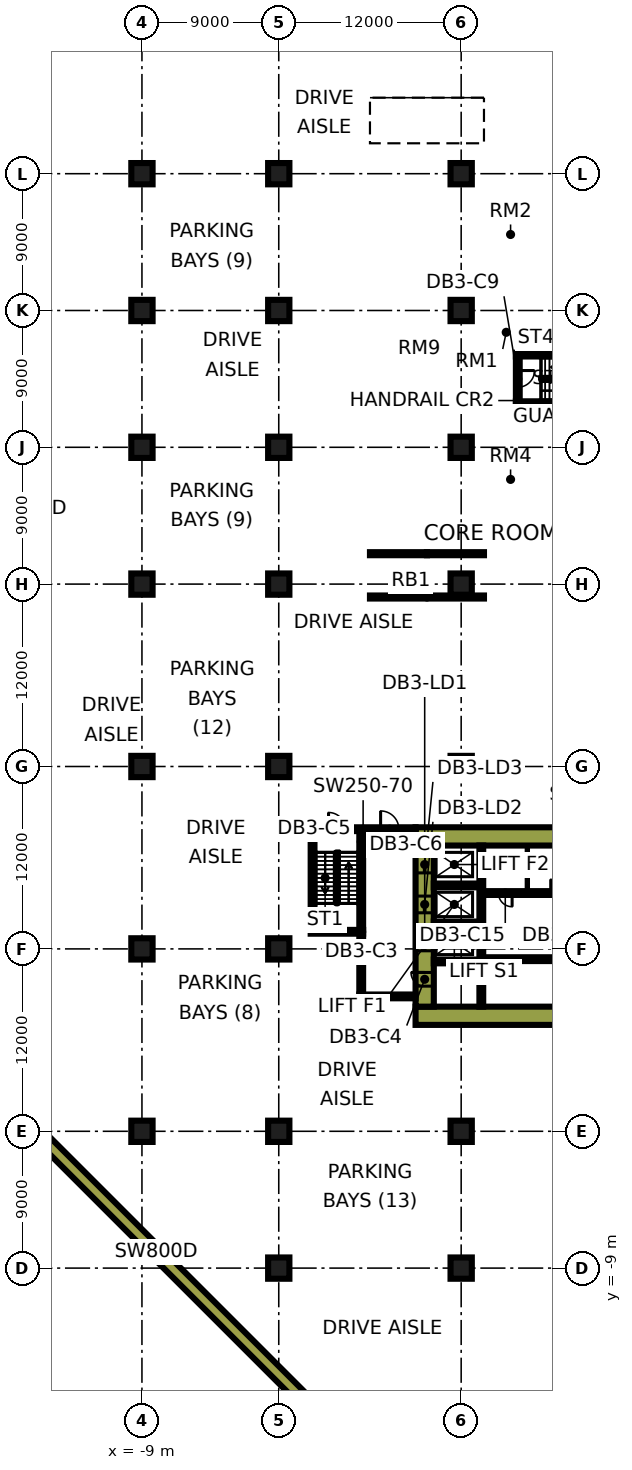
"""IFC4 building model, lengths in metres.
Left out: names, types, materials, properties, quantities, classifications, styles, units other than length and angle.
Written with IfcOpenShell. Run it as: python <this file> out.ifc"""

import sys

from ifc_helpers import new_model, si_unit, direction, frame, frame_2d, origin, origin_2d, place, context, subcontext, project, spatial, rectangle, extrude, element, fill, save


model = new_model("IFC4")
c1 = context("Model", 3, precision=1e-05, world=origin(), true_north=direction((0.0, 1.0)))
c2 = subcontext(c1, "Body", "Model", "MODEL_VIEW")
j1 = project(units=[si_unit("LENGTHUNIT", "METRE"), si_unit("PLANEANGLEUNIT", "RADIAN")], contexts=[c1])
p1 = place(None, origin())
s1 = spatial("IfcSite", under=j1, at=p1, CompositionType="ELEMENT")
p2 = place(p1, origin())
s2 = spatial("IfcBuilding", under=s1, at=p2, CompositionType="ELEMENT")
p3 = place(p2, frame((0.0, 0.0, -13.5)))
s3 = spatial("IfcBuildingStorey", under=s2, at=p3, CompositionType="ELEMENT", Elevation=-13.5)
for number, where, z_axis, x_axis in (
    (1, (-9.0, 0.0, 0.0), (0.0, 0.0, 1.0), (1.0, 0.0, 0.0)),
    (2, (-9.0, 12.0, 0.0), (0.0, 0.0, 1.0), (1.0, 0.0, 0.0)),
    (3, (-9.0, 24.0, 0.0), (0.0, 0.0, 1.0), (1.0, 0.0, 0.0)),
    (4, (-9.0, 36.0, 0.0), (0.0, 0.0, 1.0), (1.0, 0.0, 0.0)),
    (5, (-9.0, 45.0, 0.0), (0.0, 0.0, 1.0), (1.0, 0.0, 0.0)),
    (6, (-9.0, 54.0, 0.0), (0.0, 0.0, 1.0), (1.0, 0.0, 0.0)),
    (7, (-9.0, 63.0, 0.0), (0.0, 0.0, 1.0), (1.0, 0.0, 0.0)),
    (8, (0.0, -9.0, 0.0), (0.0, 0.0, 1.0), (1.0, 0.0, 0.0)),
    (9, (0.0, 0.0, 0.0), (0.0, 0.0, 1.0), (1.0, 0.0, 0.0)),
    (10, (0.0, 12.0, 0.0), (0.0, 0.0, 1.0), (1.0, 0.0, 0.0)),
    (11, (0.0, 24.0, 0.0), (0.0, 0.0, 1.0), (1.0, 0.0, 0.0)),
    (12, (0.0, 36.0, 0.0), (0.0, 0.0, 1.0), (1.0, 0.0, 0.0)),
    (13, (0.0, 45.0, 0.0), (0.0, 0.0, 1.0), (1.0, 0.0, 0.0)),
    (14, (0.0, 54.0, 0.0), (0.0, 0.0, 1.0), (1.0, 0.0, 0.0)),
    (15, (0.0, 63.0, 0.0), (0.0, 0.0, 1.0), (1.0, 0.0, 0.0)),
    (16, (12.0, -9.0, 0.0), (0.0, 0.0, 1.0), (1.0, 0.0, 0.0)),
    (17, (12.0, 0.0, 0.0), (0.0, 0.0, 1.0), (1.0, 0.0, 0.0)),
    (18, (12.0, 24.0, 0.0), (0.0, 0.0, 1.0), (1.0, 0.0, 0.0)),
    (19, (12.0, 36.0, 0.0), (0.0, 0.0, 1.0), (1.0, 0.0, 0.0)),
    (20, (12.0, 45.0, 0.0), (0.0, 0.0, 1.0), (1.0, 0.0, 0.0)),
    (21, (12.0, 54.0, 0.0), (0.0, 0.0, 1.0), (1.0, 0.0, 0.0)),
    (22, (12.0, 63.0, 0.0), (0.0, 0.0, 1.0), (1.0, 0.0, 0.0)),
):
    element("IfcColumn", number, at=place(p3, frame(where, z_axis=z_axis, x_axis=x_axis)), inside=s3, PredefinedType="COLUMN", context=c2, shape_type="SweptSolid", body=[
        extrude(rectangle(XDim=1.4, YDim=1.4, at=origin_2d()), origin(), (0.0, 0.0, 1.0), 4.5),
    ])
p4 = place(p3, frame((9.0, 7.6, 0.0), z_axis=(0.0, 0.0, 1.0), x_axis=(1.0, 0.0, 0.0)))
e23 = element("IfcWall", 23, at=p4, inside=s3, PredefinedType="SHEAR", context=c2, shape_type="SweptSolid", body=[
    extrude(rectangle(XDim=25.0, YDim=1.2, at=frame_2d((12.5, 0.0))), origin(), (0.0, 0.0, 1.0), 4.5),
])
p5 = place(p3, frame((9.0, 19.4, 0.0), z_axis=(0.0, 0.0, 1.0), x_axis=(1.0, 0.0, 0.0)))
e24 = element("IfcWall", 24, at=p5, inside=s3, PredefinedType="SHEAR", context=c2, shape_type="SweptSolid", body=[
    extrude(rectangle(XDim=25.0, YDim=1.2, at=frame_2d((12.5, 0.0))), origin(), (0.0, 0.0, 1.0), 4.5),
])
p6 = place(p5, frame((19.1, 0.0, 0.0)))
e25 = element("IfcOpeningElement", 25, at=p6, cuts=e24, PredefinedType="OPENING", context=c2, shape_type="SweptSolid", body=[
    extrude(rectangle(XDim=1.8, YDim=2.4, at=frame_2d((0.9, 1.2))), frame((0.0, 0.61, 0.0), z_axis=(0.0, -1.0, 0.0), x_axis=(1.0, 0.0, 0.0)), (0.0, 0.0, 1.0), 1.22),
])
p7 = place(p3, frame((9.6, 8.2, 0.0), z_axis=(0.0, 0.0, 1.0), x_axis=(0.0, 1.0, 0.0)))
e26 = element("IfcWall", 26, at=p7, inside=s3, PredefinedType="SHEAR", context=c2, shape_type="SweptSolid", body=[
    extrude(rectangle(XDim=10.6, YDim=1.2, at=frame_2d((5.3, 0.0))), origin(), (0.0, 0.0, 1.0), 4.5),
])
p8 = place(p7, frame((3.675, 0.0, 0.0)))
e27 = element("IfcOpeningElement", 27, at=p8, cuts=e26, PredefinedType="OPENING", context=c2, shape_type="SweptSolid", body=[
    extrude(rectangle(XDim=1.1, YDim=2.2, at=frame_2d((0.55, 1.1))), frame((0.0, 0.61, 0.0), z_axis=(0.0, -1.0, 0.0), x_axis=(1.0, 0.0, 0.0)), (0.0, 0.0, 1.0), 1.22),
])
p9 = place(p7, frame((6.175, 0.0, 0.0)))
e28 = element("IfcOpeningElement", 28, at=p9, cuts=e26, PredefinedType="OPENING", context=c2, shape_type="SweptSolid", body=[
    extrude(rectangle(XDim=1.1, YDim=2.2, at=frame_2d((0.55, 1.1))), frame((0.0, 0.61, 0.0), z_axis=(0.0, -1.0, 0.0), x_axis=(1.0, 0.0, 0.0)), (0.0, 0.0, 1.0), 1.22),
])
p10 = place(p7, frame((8.8, 0.0, 0.0)))
e29 = element("IfcOpeningElement", 29, at=p10, cuts=e26, PredefinedType="OPENING", context=c2, shape_type="SweptSolid", body=[
    extrude(rectangle(XDim=1.1, YDim=2.2, at=frame_2d((0.55, 1.1))), frame((0.0, 0.61, 0.0), z_axis=(0.0, -1.0, 0.0), x_axis=(1.0, 0.0, 0.0)), (0.0, 0.0, 1.0), 1.22),
])
p11 = place(p7, frame((1.35, 0.0, 0.0)))
e30 = element("IfcOpeningElement", 30, at=p11, cuts=e26, PredefinedType="OPENING", context=c2, shape_type="SweptSolid", body=[
    extrude(rectangle(XDim=0.9, YDim=2.1, at=frame_2d((0.45, 1.05))), frame((0.0, 0.61, 0.0), z_axis=(0.0, -1.0, 0.0), x_axis=(1.0, 0.0, 0.0)), (0.0, 0.0, 1.0), 1.22),
])
p12 = place(p3, frame((13.325, 8.2, 0.0), z_axis=(0.0, 0.0, 1.0), x_axis=(0.0, 1.0, 0.0)))
e31 = element("IfcWall", 31, at=p12, inside=s3, PredefinedType="SHEAR", context=c2, shape_type="SweptSolid", body=[
    extrude(rectangle(XDim=10.6, YDim=0.25, at=frame_2d((5.3, 0.0))), origin(), (0.0, 0.0, 1.0), 4.5),
])
p13 = place(p3, frame((13.45, 11.325, 0.0), z_axis=(0.0, 0.0, 1.0), x_axis=(1.0, 0.0, 0.0)))
e32 = element("IfcWall", 32, at=p13, inside=s3, PredefinedType="SHEAR", context=c2, shape_type="SweptSolid", body=[
    extrude(rectangle(XDim=19.35, YDim=0.25, at=frame_2d((9.675, 0.0))), origin(), (0.0, 0.0, 1.0), 4.5),
])
p14 = place(p13, frame((4.925, 0.0, 0.0)))
e33 = element("IfcOpeningElement", 33, at=p14, cuts=e32, PredefinedType="OPENING", context=c2, shape_type="SweptSolid", body=[
    extrude(rectangle(XDim=0.9, YDim=2.1, at=frame_2d((0.45, 1.05))), frame((0.0, 0.135, 0.0), z_axis=(0.0, -1.0, 0.0), x_axis=(1.0, 0.0, 0.0)), (0.0, 0.0, 1.0), 0.27),
])
p15 = place(p13, frame((12.3, 0.0, 0.0)))
e34 = element("IfcOpeningElement", 34, at=p15, cuts=e32, PredefinedType="OPENING", context=c2, shape_type="SweptSolid", body=[
    extrude(rectangle(XDim=0.9, YDim=2.1, at=frame_2d((0.45, 1.05))), frame((0.0, 0.135, 0.0), z_axis=(0.0, -1.0, 0.0), x_axis=(1.0, 0.0, 0.0)), (0.0, 0.0, 1.0), 0.27),
])
p16 = place(p13, frame((16.475, 0.0, 0.0)))
e35 = element("IfcOpeningElement", 35, at=p16, cuts=e32, PredefinedType="OPENING", context=c2, shape_type="SweptSolid", body=[
    extrude(rectangle(XDim=0.9, YDim=2.1, at=frame_2d((0.45, 1.05))), frame((0.0, 0.135, 0.0), z_axis=(0.0, -1.0, 0.0), x_axis=(1.0, 0.0, 0.0)), (0.0, 0.0, 1.0), 0.27),
])
p17 = place(p3, frame((13.45, 15.675, 0.0), z_axis=(0.0, 0.0, 1.0), x_axis=(1.0, 0.0, 0.0)))
e36 = element("IfcWall", 36, at=p17, inside=s3, PredefinedType="SHEAR", context=c2, shape_type="SweptSolid", body=[
    extrude(rectangle(XDim=13.75, YDim=0.25, at=frame_2d((6.875, 0.0))), origin(), (0.0, 0.0, 1.0), 4.5),
])
p18 = place(p17, frame((1.001, 0.0, 0.0)))
e37 = element("IfcOpeningElement", 37, at=p18, cuts=e36, PredefinedType="OPENING", context=c2, shape_type="SweptSolid", body=[
    extrude(rectangle(XDim=0.9, YDim=2.1, at=frame_2d((0.45, 1.05))), frame((0.0, 0.135, 0.0), z_axis=(0.0, -1.0, 0.0), x_axis=(1.0, 0.0, 0.0)), (0.0, 0.0, 1.0), 0.27),
])
p19 = place(p17, frame((4.441, 0.0, 0.0)))
e38 = element("IfcOpeningElement", 38, at=p19, cuts=e36, PredefinedType="OPENING", context=c2, shape_type="SweptSolid", body=[
    extrude(rectangle(XDim=0.9, YDim=2.1, at=frame_2d((0.45, 1.05))), frame((0.0, 0.135, 0.0), z_axis=(0.0, -1.0, 0.0), x_axis=(1.0, 0.0, 0.0)), (0.0, 0.0, 1.0), 0.27),
])
p20 = place(p17, frame((8.365, 0.0, 0.0)))
e39 = element("IfcOpeningElement", 39, at=p20, cuts=e36, PredefinedType="OPENING", context=c2, shape_type="SweptSolid", body=[
    extrude(rectangle(XDim=0.9, YDim=2.1, at=frame_2d((0.45, 1.05))), frame((0.0, 0.135, 0.0), z_axis=(0.0, -1.0, 0.0), x_axis=(1.0, 0.0, 0.0)), (0.0, 0.0, 1.0), 0.27),
])
p21 = place(p17, frame((11.8, 0.0, 0.0)))
e40 = element("IfcOpeningElement", 40, at=p21, cuts=e36, PredefinedType="OPENING", context=c2, shape_type="SweptSolid", body=[
    extrude(rectangle(XDim=0.9, YDim=2.1, at=frame_2d((0.45, 1.05))), frame((0.0, 0.135, 0.0), z_axis=(0.0, -1.0, 0.0), x_axis=(1.0, 0.0, 0.0)), (0.0, 0.0, 1.0), 0.27),
])
for number, where, z_axis, x_axis in (
    (41, (10.2, 11.175, 0.0), (0.0, 0.0, 1.0), (1.0, 0.0, 0.0)),
    (42, (10.2, 13.675, 0.0), (0.0, 0.0, 1.0), (1.0, 0.0, 0.0)),
    (43, (10.2, 16.175, 0.0), (0.0, 0.0, 1.0), (1.0, 0.0, 0.0)),
):
    element("IfcWall", number, at=place(p3, frame(where, z_axis=z_axis, x_axis=x_axis)), inside=s3, PredefinedType="SHEAR", context=c2, shape_type="SweptSolid", body=[
        extrude(rectangle(XDim=3.0, YDim=0.25, at=frame_2d((1.5, 0.0))), origin(), (0.0, 0.0, 1.0), 4.5),
    ])
p22 = place(p3, frame((2.1, 19.875, 0.0), z_axis=(0.0, 0.0, 1.0), x_axis=(1.0, 0.0, 0.0)))
e44 = element("IfcWall", 44, at=p22, inside=s3, PredefinedType="SHEAR", context=c2, shape_type="SweptSolid", body=[
    extrude(rectangle(XDim=6.9, YDim=0.25, at=frame_2d((3.45, 0.0))), origin(), (0.0, 0.0, 1.0), 4.5),
])
p23 = place(p22, frame((1.175, 0.0, 0.0)))
e45 = element("IfcOpeningElement", 45, at=p23, cuts=e44, PredefinedType="OPENING", context=c2, shape_type="SweptSolid", body=[
    extrude(rectangle(XDim=1.1, YDim=2.2, at=frame_2d((0.55, 1.1))), frame((0.0, 0.135, 0.0), z_axis=(0.0, -1.0, 0.0), x_axis=(1.0, 0.0, 0.0)), (0.0, 0.0, 1.0), 0.27),
])
p24 = place(p22, frame((4.6, 0.0, 0.0)))
e46 = element("IfcOpeningElement", 46, at=p24, cuts=e44, PredefinedType="OPENING", context=c2, shape_type="SweptSolid", body=[
    extrude(rectangle(XDim=1.2, YDim=2.2, at=frame_2d((0.6, 1.1))), frame((0.0, 0.135, 0.0), z_axis=(0.0, -1.0, 0.0), x_axis=(1.0, 0.0, 0.0)), (0.0, 0.0, 1.0), 0.27),
])
p25 = place(p3, frame((2.1, 13.125, 0.0), z_axis=(0.0, 0.0, 1.0), x_axis=(1.0, 0.0, 0.0)))
e47 = element("IfcWall", 47, at=p25, inside=s3, PredefinedType="SHEAR", context=c2, shape_type="SweptSolid", body=[
    extrude(rectangle(XDim=3.45, YDim=0.25, at=frame_2d((1.725, 0.0))), origin(), (0.0, 0.0, 1.0), 4.5),
])
p26 = place(p3, frame((2.225, 13.25, 0.0), z_axis=(0.0, 0.0, 1.0), x_axis=(0.0, 1.0, 0.0)))
e48 = element("IfcWall", 48, at=p26, inside=s3, PredefinedType="SHEAR", context=c2, shape_type="SweptSolid", body=[
    extrude(rectangle(XDim=6.5, YDim=0.25, at=frame_2d((3.25, 0.0))), origin(), (0.0, 0.0, 1.0), 4.5),
])
p27 = place(p3, frame((5.425, 13.25, 0.0), z_axis=(0.0, 0.0, 1.0), x_axis=(0.0, 1.0, 0.0)))
e49 = element("IfcWall", 49, at=p27, inside=s3, PredefinedType="SHEAR", context=c2, shape_type="SweptSolid", body=[
    extrude(rectangle(XDim=6.5, YDim=0.25, at=frame_2d((3.25, 0.0))), origin(), (0.0, 0.0, 1.0), 4.5),
])
p28 = place(p27, frame((5.25, 0.0, 0.0)))
e50 = element("IfcOpeningElement", 50, at=p28, cuts=e49, PredefinedType="OPENING", context=c2, shape_type="SweptSolid", body=[
    extrude(rectangle(XDim=1.1, YDim=2.2, at=frame_2d((0.55, 1.1))), frame((0.0, 0.135, 0.0), z_axis=(0.0, -1.0, 0.0), x_axis=(1.0, 0.0, 0.0)), (0.0, 0.0, 1.0), 0.27),
])
p29 = place(p3, frame((5.3, 8.875, 0.0), z_axis=(0.0, 0.0, 1.0), x_axis=(1.0, 0.0, 0.0)))
e51 = element("IfcWall", 51, at=p29, inside=s3, PredefinedType="SHEAR", context=c2, shape_type="SweptSolid", body=[
    extrude(rectangle(XDim=3.7, YDim=0.25, at=frame_2d((1.85, 0.0))), origin(), (0.0, 0.0, 1.0), 4.5),
])
p30 = place(p3, frame((5.425, 9.0, 0.0), z_axis=(0.0, 0.0, 1.0), x_axis=(0.0, 1.0, 0.0)))
e52 = element("IfcWall", 52, at=p30, inside=s3, PredefinedType="SHEAR", context=c2, shape_type="SweptSolid", body=[
    extrude(rectangle(XDim=4.0, YDim=0.25, at=frame_2d((2.0, 0.0))), origin(), (0.0, 0.0, 1.0), 4.5),
])
for number, where, z_axis, x_axis in (
    (53, (15.6, 47.9, 0.0), (0.0, 0.0, 1.0), (1.0, 0.0, 0.0)),
    (54, (15.6, 51.1, 0.0), (0.0, 0.0, 1.0), (1.0, 0.0, 0.0)),
):
    element("IfcWall", number, at=place(p3, frame(where, z_axis=z_axis, x_axis=x_axis)), inside=s3, PredefinedType="SHEAR", context=c2, shape_type="SweptSolid", body=[
        extrude(rectangle(XDim=7.0, YDim=0.25, at=frame_2d((3.5, 0.0))), origin(), (0.0, 0.0, 1.0), 4.5),
    ])
p31 = place(p3, frame((15.725, 48.025, 0.0), z_axis=(0.0, 0.0, 1.0), x_axis=(0.0, 1.0, 0.0)))
e55 = element("IfcWall", 55, at=p31, inside=s3, PredefinedType="SHEAR", context=c2, shape_type="SweptSolid", body=[
    extrude(rectangle(XDim=2.95, YDim=0.25, at=frame_2d((1.475, 0.0))), origin(), (0.0, 0.0, 1.0), 4.5),
])
p32 = place(p31, frame((0.925, 0.0, 0.0)))
e56 = element("IfcOpeningElement", 56, at=p32, cuts=e55, PredefinedType="OPENING", context=c2, shape_type="SweptSolid", body=[
    extrude(rectangle(XDim=1.1, YDim=2.2, at=frame_2d((0.55, 1.1))), frame((0.0, 0.135, 0.0), z_axis=(0.0, -1.0, 0.0), x_axis=(1.0, 0.0, 0.0)), (0.0, 0.0, 1.0), 0.27),
])
p33 = place(p3, frame((-6.294, 83.717, 0.0), z_axis=(0.0, 0.0, 1.0), x_axis=(-0.707112814855, -0.707100747466, 0.0)))
e57 = element("IfcWall", 57, at=p33, inside=s3, PredefinedType="SOLIDWALL", context=c2, shape_type="SweptSolid", body=[
    extrude(rectangle(XDim=20.231, YDim=0.8, at=frame_2d((10.116, 0.0))), origin(), (0.0, 0.0, 1.0), 4.5),
])
p34 = place(p3, frame((-20.717, 4.706, 0.0), z_axis=(0.0, 0.0, 1.0), x_axis=(0.707103370229, -0.707110192127, 0.0)))
e58 = element("IfcWall", 58, at=p34, inside=s3, PredefinedType="SOLIDWALL", context=c2, shape_type="SweptSolid", body=[
    extrude(rectangle(XDim=35.788, YDim=0.8, at=frame_2d((17.894, 0.0))), origin(), (0.0, 0.0, 1.0), 4.5),
])
p35 = place(p3, frame((16.353, 15.8, 0.0), z_axis=(0.0, 0.0, 1.0), x_axis=(0.0, 1.0, 0.0)))
e59 = element("IfcWall", 59, at=p35, inside=s3, PredefinedType="PARTITIONING", context=c2, shape_type="SweptSolid", body=[
    extrude(rectangle(XDim=3.0, YDim=0.15, at=frame_2d((1.5, 0.0))), origin(), (0.0, 0.0, 1.0), 4.05),
])
for number, where, z_axis, x_axis in (
    (60, (6.0, 38.0, 0.0), (0.0, 0.0, 1.0), (1.0, 0.0, 0.0)),
    (61, (9.75, 38.0, 0.0), (0.0, 0.0, 1.0), (1.0, 0.0, 0.0)),
):
    element("IfcWall", number, at=place(p3, frame(where, z_axis=z_axis, x_axis=x_axis)), inside=s3, PredefinedType="SOLIDWALL", context=c2, shape_type="SweptSolid", body=[
        extrude(rectangle(XDim=3.75, YDim=0.2, at=frame_2d((1.875, 0.0))), origin(), (0.0, 0.0, 1.0), 3.95),
    ])
p36 = place(p3, frame((6.0, 35.15, 0.0), z_axis=(0.0, 0.0, 1.0), x_axis=(1.0, 0.0, 0.0)))
e62 = element("IfcWall", 62, at=p36, inside=s3, PredefinedType="SOLIDWALL", context=c2, shape_type="SweptSolid", body=[
    extrude(rectangle(XDim=7.5, YDim=0.2, at=frame_2d((3.75, 0.0))), origin(), (0.0, 0.0, 1.0), 4.188),
])
p37 = place(p8, origin())
e63 = element("IfcDoor", 63, at=p37, inside=s3, OperationType="DOUBLE_DOOR_SLIDING", PredefinedType="DOOR", context=c2, shape_type="SweptSolid", body=[
    extrude(rectangle(XDim=1.1, YDim=2.2, at=frame_2d((0.55, 1.1))), frame((0.0, 0.025, 0.0), z_axis=(0.0, -1.0, 0.0), x_axis=(1.0, 0.0, 0.0)), (0.0, 0.0, 1.0), 0.05),
])
fill(e27, e63)
p38 = place(p9, origin())
e64 = element("IfcDoor", 64, at=p38, inside=s3, OperationType="DOUBLE_DOOR_SLIDING", PredefinedType="DOOR", context=c2, shape_type="SweptSolid", body=[
    extrude(rectangle(XDim=1.1, YDim=2.2, at=frame_2d((0.55, 1.1))), frame((0.0, 0.025, 0.0), z_axis=(0.0, -1.0, 0.0), x_axis=(1.0, 0.0, 0.0)), (0.0, 0.0, 1.0), 0.05),
])
fill(e28, e64)
p39 = place(p10, origin())
e65 = element("IfcDoor", 65, at=p39, inside=s3, OperationType="DOUBLE_DOOR_SLIDING", PredefinedType="DOOR", context=c2, shape_type="SweptSolid", body=[
    extrude(rectangle(XDim=1.1, YDim=2.2, at=frame_2d((0.55, 1.1))), frame((0.0, 0.025, 0.0), z_axis=(0.0, -1.0, 0.0), x_axis=(1.0, 0.0, 0.0)), (0.0, 0.0, 1.0), 0.05),
])
fill(e29, e65)
p40 = place(p28, origin())
e66 = element("IfcDoor", 66, at=p40, inside=s3, OperationType="SINGLE_SWING_RIGHT", PredefinedType="DOOR", context=c2, shape_type="SweptSolid", body=[
    extrude(rectangle(XDim=1.1, YDim=2.2, at=frame_2d((0.55, 1.1))), frame((0.0, 0.025, 0.0), z_axis=(0.0, -1.0, 0.0), x_axis=(1.0, 0.0, 0.0)), (0.0, 0.0, 1.0), 0.05),
])
fill(e50, e66)
p41 = place(p11, frame((0.9, 0.0, 0.0), z_axis=(0.0, 0.0, 1.0), x_axis=(-1.0, 0.0, 0.0)))
e67 = element("IfcDoor", 67, at=p41, inside=s3, OperationType="SINGLE_SWING_RIGHT", PredefinedType="DOOR", context=c2, shape_type="SweptSolid", body=[
    extrude(rectangle(XDim=0.9, YDim=2.1, at=frame_2d((0.45, 1.05))), frame((0.0, 0.025, 0.0), z_axis=(0.0, -1.0, 0.0), x_axis=(1.0, 0.0, 0.0)), (0.0, 0.0, 1.0), 0.05),
])
fill(e30, e67)
p42 = place(p23, origin())
e68 = element("IfcDoor", 68, at=p42, inside=s3, OperationType="SINGLE_SWING_LEFT", PredefinedType="DOOR", context=c2, shape_type="SweptSolid", body=[
    extrude(rectangle(XDim=1.1, YDim=2.2, at=frame_2d((0.55, 1.1))), frame((0.0, 0.025, 0.0), z_axis=(0.0, -1.0, 0.0), x_axis=(1.0, 0.0, 0.0)), (0.0, 0.0, 1.0), 0.05),
])
fill(e45, e68)
p43 = place(p24, origin())
e69 = element("IfcDoor", 69, at=p43, inside=s3, OperationType="SINGLE_SWING_LEFT", PredefinedType="DOOR", context=c2, shape_type="SweptSolid", body=[
    extrude(rectangle(XDim=1.2, YDim=2.2, at=frame_2d((0.6, 1.1))), frame((0.0, 0.025, 0.0), z_axis=(0.0, -1.0, 0.0), x_axis=(1.0, 0.0, 0.0)), (0.0, 0.0, 1.0), 0.05),
])
fill(e46, e69)
p44 = place(p32, origin())
e70 = element("IfcDoor", 70, at=p44, inside=s3, OperationType="SINGLE_SWING_RIGHT", PredefinedType="DOOR", context=c2, shape_type="SweptSolid", body=[
    extrude(rectangle(XDim=1.1, YDim=2.2, at=frame_2d((0.55, 1.1))), frame((0.0, 0.025, 0.0), z_axis=(0.0, -1.0, 0.0), x_axis=(1.0, 0.0, 0.0)), (0.0, 0.0, 1.0), 0.05),
])
fill(e56, e70)
p45 = place(p18, origin())
e71 = element("IfcDoor", 71, at=p45, inside=s3, OperationType="SINGLE_SWING_RIGHT", PredefinedType="DOOR", context=c2, shape_type="SweptSolid", body=[
    extrude(rectangle(XDim=0.9, YDim=2.1, at=frame_2d((0.45, 1.05))), frame((0.0, 0.025, 0.0), z_axis=(0.0, -1.0, 0.0), x_axis=(1.0, 0.0, 0.0)), (0.0, 0.0, 1.0), 0.05),
])
fill(e37, e71)
p46 = place(p19, origin())
e72 = element("IfcDoor", 72, at=p46, inside=s3, OperationType="SINGLE_SWING_LEFT", PredefinedType="DOOR", context=c2, shape_type="SweptSolid", body=[
    extrude(rectangle(XDim=0.9, YDim=2.1, at=frame_2d((0.45, 1.05))), frame((0.0, 0.025, 0.0), z_axis=(0.0, -1.0, 0.0), x_axis=(1.0, 0.0, 0.0)), (0.0, 0.0, 1.0), 0.05),
])
fill(e38, e72)
save(model, sys.argv[1])
